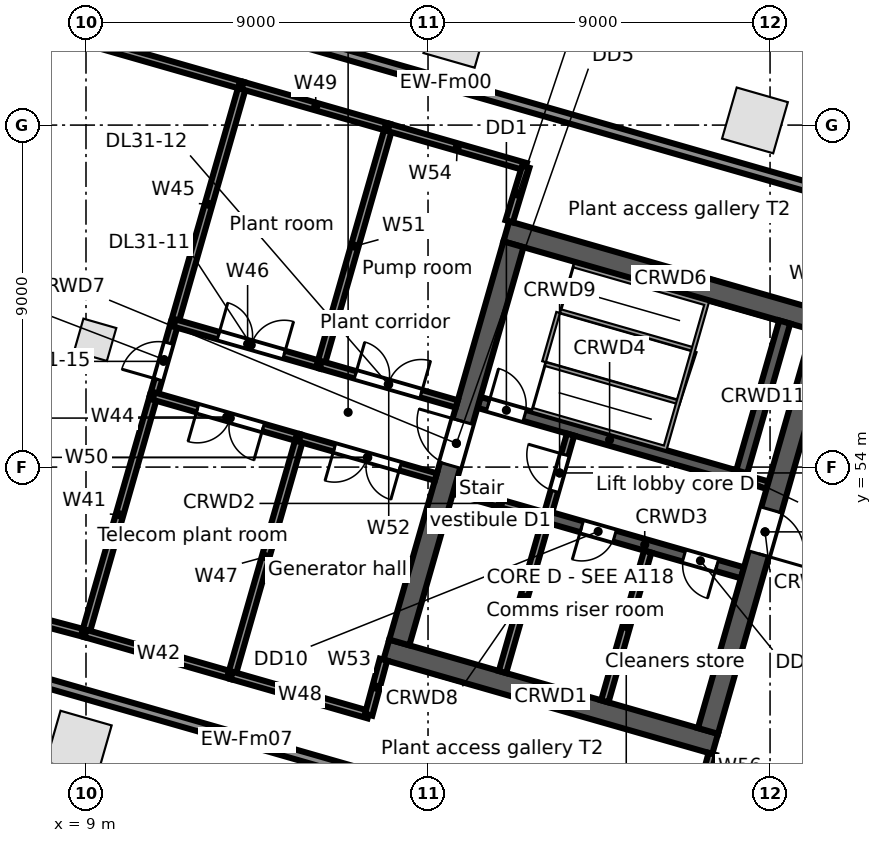
"""IFC4 building model, lengths in metres.
Left out: names, types, materials, properties, quantities, classifications, styles, units other than length and angle.
Written with IfcOpenShell. Run it as: python <this file> out.ifc"""

import sys

from ifc_helpers import new_model, si_unit, direction, frame, frame_2d, origin, origin_2d, place, context, subcontext, project, spatial, rectangle, extrude, element, fill, save


model = new_model("IFC4")
c1 = context("Model", 3, precision=1e-05, world=origin(), true_north=direction((0.0, 1.0)))
c2 = subcontext(c1, "Body", "Model", "MODEL_VIEW")
j1 = project(units=[si_unit("LENGTHUNIT", "METRE"), si_unit("PLANEANGLEUNIT", "RADIAN")], contexts=[c1])
p1 = place(None, origin())
s1 = spatial("IfcSite", under=j1, at=p1, CompositionType="ELEMENT")
p2 = place(p1, origin())
s2 = spatial("IfcBuilding", under=s1, at=p2, CompositionType="ELEMENT")
p3 = place(p2, frame((0.0, 0.0, 149.9)))
s3 = spatial("IfcBuildingStorey", under=s2, at=p3, CompositionType="ELEMENT", Elevation=149.9)
for number, where, z_axis, x_axis in (
    (1, (26.603, 63.124, 0.0), (0.0, 0.0, 1.0), (-0.961, 0.276, 0.0)),
    (2, (18.746, 65.376, 0.0), (0.0, 0.0, 1.0), (-0.961, 0.276, 0.0)),
    (3, (8.81, 46.722, 0.0), (0.0, 0.0, 1.0), (0.961, -0.276, 0.0)),
):
    element("IfcColumn", number, at=place(p3, frame(where, z_axis=z_axis, x_axis=x_axis)), inside=s3, PredefinedType="COLUMN", context=c2, shape_type="SweptSolid", body=[
        extrude(rectangle(XDim=1.4, YDim=1.4, at=origin_2d()), origin(), (0.0, 0.0, 1.0), 5.0),
    ])
p4 = place(p3, frame((9.241, 57.35, 0.0), z_axis=(0.0, 0.0, 1.0), x_axis=(0.961261695938, -0.275637355817, 0.0)))
e4 = element("IfcColumn", 4, at=p4, inside=s3, PredefinedType="COLUMN", context=c2, shape_type="SweptSolid", body=[
    extrude(rectangle(XDim=0.9, YDim=0.9, at=origin_2d()), origin(), (0.0, 0.0, 1.0), 5.0),
])
p5 = place(p3, frame((3.135, 68.5, 0.0), z_axis=(0.0, 0.0, 1.0), x_axis=(0.961261620067, -0.275637620413, 0.0)))
e5 = element("IfcWall", 5, at=p5, inside=s3, PredefinedType="STANDARD", context=c2, shape_type="SweptSolid", body=[
    extrude(rectangle(XDim=31.907, YDim=0.25, at=frame_2d((15.953, 0.0))), origin(), (0.0, 0.0, 1.0), 3.768),
])
p6 = place(p3, frame((26.726, 42.937, 0.0), z_axis=(0.0, 0.0, 1.0), x_axis=(-0.96126039977, 0.275641876052, 0.0)))
e6 = element("IfcWall", 6, at=p6, inside=s3, PredefinedType="STANDARD", context=c2, shape_type="SweptSolid", body=[
    extrude(rectangle(XDim=28.083, YDim=0.25, at=frame_2d((14.041, 0.0))), origin(), (0.0, 0.0, 1.0), 3.768),
])
p7 = place(p3, frame((16.904, 49.197, 0.0), z_axis=(0.0, 0.0, 1.0), x_axis=(0.96126248289, -0.275634611374, 0.0)))
e7 = element("IfcWall", 7, at=p7, inside=s3, PredefinedType="SOLIDWALL", context=c2, shape_type="SweptSolid", body=[
    extrude(rectangle(XDim=9.0, YDim=0.55, at=frame_2d((4.5, 0.0))), origin(), (0.0, 0.0, 1.0), 4.68),
])
p8 = place(p3, frame((18.68, 53.396, 0.0), z_axis=(0.0, 0.0, 1.0), x_axis=(0.961234387647, -0.275732573349, 0.0)))
e8 = element("IfcWall", 8, at=p8, inside=s3, PredefinedType="SOLIDWALL", context=c2, shape_type="SweptSolid", body=[
    extrude(rectangle(XDim=2.55, YDim=0.2, at=frame_2d((1.275, 0.0))), origin(), (0.0, 0.0, 1.0), 4.68),
])
p9 = place(p3, frame((21.131, 52.692, 0.0), z_axis=(0.0, 0.0, 1.0), x_axis=(0.961265220997, -0.27562506218, 0.0)))
e9 = element("IfcWall", 9, at=p9, inside=s3, PredefinedType="SOLIDWALL", context=c2, shape_type="SweptSolid", body=[
    extrude(rectangle(XDim=5.35, YDim=0.3, at=frame_2d((2.675, 0.0))), origin(), (0.0, 0.0, 1.0), 4.68),
])
p10 = place(p9, frame((0.95, 0.0, 0.0)))
e10 = element("IfcOpeningElement", 10, at=p10, cuts=e9, PredefinedType="OPENING", context=c2, shape_type="SweptSolid", body=[
    extrude(rectangle(XDim=0.9, YDim=2.1, at=frame_2d((0.45, 1.05))), frame((0.0, 0.16, 0.0), z_axis=(0.0, -1.0, 0.0), x_axis=(1.0, 0.0, 0.0)), (0.0, 0.0, 1.0), 0.32),
])
p11 = place(p9, frame((3.75, 0.0, 0.0)))
e11 = element("IfcOpeningElement", 11, at=p11, cuts=e9, PredefinedType="OPENING", context=c2, shape_type="SweptSolid", body=[
    extrude(rectangle(XDim=0.9, YDim=2.1, at=frame_2d((0.45, 1.05))), frame((0.0, 0.16, 0.0), z_axis=(0.0, -1.0, 0.0), x_axis=(1.0, 0.0, 0.0)), (0.0, 0.0, 1.0), 0.32),
])
p12 = place(p3, frame((19.341, 55.702, 0.0), z_axis=(0.0, 0.0, 1.0), x_axis=(0.961263228157, -0.27563201228, 0.0)))
e12 = element("IfcWall", 12, at=p12, inside=s3, PredefinedType="SOLIDWALL", context=c2, shape_type="SweptSolid", body=[
    extrude(rectangle(XDim=7.15, YDim=0.3, at=frame_2d((3.575, 0.0))), origin(), (0.0, 0.0, 1.0), 4.68),
])
p13 = place(p12, frame((0.25, 0.0, 0.0)))
e13 = element("IfcOpeningElement", 13, at=p13, cuts=e12, PredefinedType="OPENING", context=c2, shape_type="SweptSolid", body=[
    extrude(rectangle(XDim=1.0, YDim=2.1, at=frame_2d((0.5, 1.05))), frame((0.0, 0.16, 0.0), z_axis=(0.0, -1.0, 0.0), x_axis=(1.0, 0.0, 0.0)), (0.0, 0.0, 1.0), 0.32),
])
p14 = place(p3, frame((26.214, 53.732, 0.0), z_axis=(0.0, 0.0, 1.0), x_axis=(0.961240918172, -0.275709806194, 0.0)))
e14 = element("IfcWall", 14, at=p14, inside=s3, PredefinedType="SOLIDWALL", context=c2, shape_type="SweptSolid", body=[
    extrude(rectangle(XDim=0.75, YDim=0.2, at=frame_2d((0.375, 0.0))), origin(), (0.0, 0.0, 1.0), 4.68),
])
p15 = place(p3, frame((20.06, 60.204, 0.0), z_axis=(0.0, 0.0, 1.0), x_axis=(0.96126248289, -0.275634611374, 0.0)))
e15 = element("IfcWall", 15, at=p15, inside=s3, PredefinedType="SOLIDWALL", context=c2, shape_type="SweptSolid", body=[
    extrude(rectangle(XDim=9.0, YDim=0.55, at=frame_2d((4.5, 0.0))), origin(), (0.0, 0.0, 1.0), 4.68),
])
p16 = place(p3, frame((17.244, 49.386, 0.0), z_axis=(0.0, 0.0, 1.0), x_axis=(0.275632146085, 0.96126318979, 0.0)))
e16 = element("IfcWall", 16, at=p16, inside=s3, PredefinedType="SOLIDWALL", context=c2, shape_type="SweptSolid", body=[
    extrude(rectangle(XDim=10.9, YDim=0.55, at=frame_2d((5.45, 0.0))), origin(), (0.0, 0.0, 1.0), 4.68),
])
p17 = place(p16, frame((4.85, 0.0, 0.0)))
e17 = element("IfcOpeningElement", 17, at=p17, cuts=e16, PredefinedType="OPENING", context=c2, shape_type="SweptSolid", body=[
    extrude(rectangle(XDim=1.2, YDim=2.1, at=frame_2d((0.6, 1.05))), frame((0.0, 0.285, 0.0), z_axis=(0.0, -1.0, 0.0), x_axis=(1.0, 0.0, 0.0)), (0.0, 0.0, 1.0), 0.57),
])
p18 = place(p3, frame((19.959, 48.607, 0.0), z_axis=(0.0, 0.0, 1.0), x_axis=(0.275641165445, 0.961260603537, 0.0)))
e18 = element("IfcWall", 18, at=p18, inside=s3, PredefinedType="SOLIDWALL", context=c2, shape_type="SweptSolid", body=[
    extrude(rectangle(XDim=4.1, YDim=0.2, at=frame_2d((2.05, 0.0))), origin(), (0.0, 0.0, 1.0), 4.68),
])
p19 = place(p3, frame((21.172, 52.837, 0.0), z_axis=(0.0, 0.0, 1.0), x_axis=(0.275657676022, 0.961255868981, 0.0)))
e19 = element("IfcWall", 19, at=p19, inside=s3, PredefinedType="PARTITIONING", context=c2, shape_type="SweptSolid", body=[
    extrude(rectangle(XDim=2.1, YDim=0.2, at=frame_2d((1.05, 0.0))), origin(), (0.0, 0.0, 1.0), 4.68),
])
p20 = place(p19, frame((0.55, 0.0, 0.0)))
e20 = element("IfcOpeningElement", 20, at=p20, cuts=e19, PredefinedType="OPENING", context=c2, shape_type="SweptSolid", body=[
    extrude(rectangle(XDim=1.0, YDim=2.1, at=frame_2d((0.5, 1.05))), frame((0.0, 0.11, 0.0), z_axis=(0.0, -1.0, 0.0), x_axis=(1.0, 0.0, 0.0)), (0.0, 0.0, 1.0), 0.22),
])
p21 = place(p3, frame((22.651, 47.835, 0.0), z_axis=(0.0, 0.0, 1.0), x_axis=(0.275625388668, 0.961265127383, 0.0)))
e21 = element("IfcWall", 21, at=p21, inside=s3, PredefinedType="PARTITIONING", context=c2, shape_type="SweptSolid", body=[
    extrude(rectangle(XDim=4.1, YDim=0.2, at=frame_2d((2.05, 0.0))), origin(), (0.0, 0.0, 1.0), 4.68),
])
p22 = place(p3, frame((26.256, 53.876, 0.0), z_axis=(0.0, 0.0, 1.0), x_axis=(0.275641165445, 0.961260603537, 0.0)))
e22 = element("IfcWall", 22, at=p22, inside=s3, PredefinedType="SOLIDWALL", context=c2, shape_type="SweptSolid", body=[
    extrude(rectangle(XDim=4.1, YDim=0.3, at=frame_2d((2.05, 0.0))), origin(), (0.0, 0.0, 1.0), 4.68),
])
p23 = place(p3, frame((25.366, 47.057, 0.0), z_axis=(0.0, 0.0, 1.0), x_axis=(0.275632146085, 0.96126318979, 0.0)))
e23 = element("IfcWall", 23, at=p23, inside=s3, PredefinedType="SOLIDWALL", context=c2, shape_type="SweptSolid", body=[
    extrude(rectangle(XDim=10.9, YDim=0.55, at=frame_2d((5.45, 0.0))), origin(), (0.0, 0.0, 1.0), 4.68),
])
p24 = place(p23, frame((4.85, 0.0, 0.0)))
e24 = element("IfcOpeningElement", 24, at=p24, cuts=e23, PredefinedType="OPENING", context=c2, shape_type="SweptSolid", body=[
    extrude(rectangle(XDim=1.2, YDim=2.1, at=frame_2d((0.6, 1.05))), frame((0.0, 0.285, 0.0), z_axis=(0.0, -1.0, 0.0), x_axis=(1.0, 0.0, 0.0)), (0.0, 0.0, 1.0), 0.57),
])
p25 = place(p3, frame((0.0, 52.0, 0.0), z_axis=(0.0, 0.0, 1.0), x_axis=(0.966705801065, -0.255890394871, 0.0)))
e25 = element("IfcWall", 25, at=p25, inside=s3, PredefinedType="PARTITIONING", context=c2, shape_type="SweptSolid", body=[
    extrude(rectangle(XDim=9.297, YDim=0.2, at=frame_2d((4.648, 0.0))), origin(), (0.0, 0.0, 1.0), 3.86),
])
p26 = place(p3, frame((3.029, 66.934, 0.0), z_axis=(0.0, 0.0, 1.0), x_axis=(0.961263796718, -0.275630029421, 0.0)))
e26 = element("IfcWall", 26, at=p26, inside=s3, PredefinedType="PARTITIONING", context=c2, shape_type="SweptSolid", body=[
    extrude(rectangle(XDim=10.5, YDim=0.2, at=frame_2d((5.25, 0.0))), origin(), (0.0, 0.0, 1.0), 3.748),
])
p27 = place(p3, frame((8.987, 49.621, 0.0), z_axis=(0.0, 0.0, 1.0), x_axis=(0.275703259795, 0.961242795832, 0.0)))
e27 = element("IfcWall", 27, at=p27, inside=s3, PredefinedType="PARTITIONING", context=c2, shape_type="SweptSolid", body=[
    extrude(rectangle(XDim=6.5, YDim=0.2, at=frame_2d((3.25, 0.0))), origin(), (0.0, 0.0, 1.0), 3.86),
])
p28 = place(p3, frame((8.987, 49.621, 0.0), z_axis=(0.0, 0.0, 1.0), x_axis=(0.961228587008, -0.275752794216, 0.0)))
e28 = element("IfcWall", 28, at=p28, inside=s3, PredefinedType="PARTITIONING", context=c2, shape_type="SweptSolid", body=[
    extrude(rectangle(XDim=4.0, YDim=0.2, at=frame_2d((2.0, 0.0))), origin(), (0.0, 0.0, 1.0), 3.748),
])
p29 = place(p3, frame((10.779, 55.869, 0.0), z_axis=(0.0, 0.0, 1.0), x_axis=(0.275575706981, 0.961279371318, 0.0)))
e29 = element("IfcWall", 29, at=p29, inside=s3, PredefinedType="PARTITIONING", context=c2, shape_type="SweptSolid", body=[
    extrude(rectangle(XDim=2.0, YDim=0.2, at=frame_2d((1.0, 0.0))), origin(), (0.0, 0.0, 1.0), 3.748),
])
p30 = place(p29, frame((0.45, 0.0, 0.0)))
e30 = element("IfcOpeningElement", 30, at=p30, cuts=e29, PredefinedType="OPENING", context=c2, shape_type="SweptSolid", body=[
    extrude(rectangle(XDim=1.0, YDim=2.1, at=frame_2d((0.5, 1.05))), frame((0.0, 0.11, 0.0), z_axis=(0.0, -1.0, 0.0), x_axis=(1.0, 0.0, 0.0)), (0.0, 0.0, 1.0), 0.22),
])
p31 = place(p3, frame((10.779, 55.869, 0.0), z_axis=(0.0, 0.0, 1.0), x_axis=(0.961244763457, -0.275696399552, 0.0)))
e31 = element("IfcWall", 31, at=p31, inside=s3, PredefinedType="PARTITIONING", context=c2, shape_type="SweptSolid", body=[
    extrude(rectangle(XDim=4.0, YDim=0.2, at=frame_2d((2.0, 0.0))), origin(), (0.0, 0.0, 1.0), 3.748),
])
p32 = place(p31, frame((1.2, 0.0, 0.0)))
e32 = element("IfcOpeningElement", 32, at=p32, cuts=e31, PredefinedType="OPENING", context=c2, shape_type="SweptSolid", body=[
    extrude(rectangle(XDim=1.8, YDim=2.1, at=frame_2d((0.9, 1.05))), frame((0.0, 0.11, 0.0), z_axis=(0.0, -1.0, 0.0), x_axis=(1.0, 0.0, 0.0)), (0.0, 0.0, 1.0), 0.22),
])
p33 = place(p3, frame((11.33, 57.791, 0.0), z_axis=(0.0, 0.0, 1.0), x_axis=(0.27565349575, 0.96125706774, 0.0)))
e33 = element("IfcWall", 33, at=p33, inside=s3, PredefinedType="PARTITIONING", context=c2, shape_type="SweptSolid", body=[
    extrude(rectangle(XDim=6.501, YDim=0.2, at=frame_2d((3.25, 0.0))), origin(), (0.0, 0.0, 1.0), 3.748),
])
p34 = place(p3, frame((11.33, 57.791, 0.0), z_axis=(0.0, 0.0, 1.0), x_axis=(0.961293276216, -0.275527198479, 0.0)))
e34 = element("IfcWall", 34, at=p34, inside=s3, PredefinedType="PARTITIONING", context=c2, shape_type="SweptSolid", body=[
    extrude(rectangle(XDim=4.0, YDim=0.2, at=frame_2d((2.0, 0.0))), origin(), (0.0, 0.0, 1.0), 4.68),
])
p35 = place(p34, frame((1.2, 0.0, 0.0)))
e35 = element("IfcOpeningElement", 35, at=p35, cuts=e34, PredefinedType="OPENING", context=c2, shape_type="SweptSolid", body=[
    extrude(rectangle(XDim=1.8, YDim=2.1, at=frame_2d((0.9, 1.05))), frame((0.0, 0.11, 0.0), z_axis=(0.0, -1.0, 0.0), x_axis=(1.0, 0.0, 0.0)), (0.0, 0.0, 1.0), 0.22),
])
p36 = place(p3, frame((12.832, 48.518, 0.0), z_axis=(0.0, 0.0, 1.0), x_axis=(0.275693305607, 0.961245650832, 0.0)))
e36 = element("IfcWall", 36, at=p36, inside=s3, PredefinedType="PARTITIONING", context=c2, shape_type="SweptSolid", body=[
    extrude(rectangle(XDim=6.5, YDim=0.2, at=frame_2d((3.25, 0.0))), origin(), (0.0, 0.0, 1.0), 4.68),
])
p37 = place(p3, frame((12.832, 48.518, 0.0), z_axis=(0.0, 0.0, 1.0), x_axis=(0.961228613303, -0.275752702557, 0.0)))
e37 = element("IfcWall", 37, at=p37, inside=s3, PredefinedType="PARTITIONING", context=c2, shape_type="SweptSolid", body=[
    extrude(rectangle(XDim=3.75, YDim=0.2, at=frame_2d((1.875, 0.0))), origin(), (0.0, 0.0, 1.0), 4.68),
])
p38 = place(p3, frame((13.122, 64.04, 0.0), z_axis=(0.0, 0.0, 1.0), x_axis=(0.961228587008, -0.275752794216, 0.0)))
e38 = element("IfcWall", 38, at=p38, inside=s3, PredefinedType="PARTITIONING", context=c2, shape_type="SweptSolid", body=[
    extrude(rectangle(XDim=4.0, YDim=0.2, at=frame_2d((2.0, 0.0))), origin(), (0.0, 0.0, 1.0), 3.748),
])
p39 = place(p3, frame((14.624, 54.766, 0.0), z_axis=(0.0, 0.0, 1.0), x_axis=(0.961263923107, -0.275629588639, 0.0)))
e39 = element("IfcWall", 39, at=p39, inside=s3, PredefinedType="PARTITIONING", context=c2, shape_type="SweptSolid", body=[
    extrude(rectangle(XDim=3.726, YDim=0.2, at=frame_2d((1.863, 0.0))), origin(), (0.0, 0.0, 1.0), 4.68),
])
p40 = place(p39, frame((0.95, 0.0, 0.0)))
e40 = element("IfcOpeningElement", 40, at=p40, cuts=e39, PredefinedType="OPENING", context=c2, shape_type="SweptSolid", body=[
    extrude(rectangle(XDim=1.8, YDim=2.1, at=frame_2d((0.9, 1.05))), frame((0.0, 0.11, 0.0), z_axis=(0.0, -1.0, 0.0), x_axis=(1.0, 0.0, 0.0)), (0.0, 0.0, 1.0), 0.22),
])
p41 = place(p3, frame((15.175, 56.689, 0.0), z_axis=(0.0, 0.0, 1.0), x_axis=(0.275693305607, 0.961245650832, 0.0)))
e41 = element("IfcWall", 41, at=p41, inside=s3, PredefinedType="PARTITIONING", context=c2, shape_type="SweptSolid", body=[
    extrude(rectangle(XDim=6.5, YDim=0.2, at=frame_2d((3.25, 0.0))), origin(), (0.0, 0.0, 1.0), 4.68),
])
p42 = place(p3, frame((15.175, 56.689, 0.0), z_axis=(0.0, 0.0, 1.0), x_axis=(0.961281280398, -0.27556904753, 0.0)))
e42 = element("IfcWall", 42, at=p42, inside=s3, PredefinedType="PARTITIONING", context=c2, shape_type="SweptSolid", body=[
    extrude(rectangle(XDim=3.726, YDim=0.2, at=frame_2d((1.863, 0.0))), origin(), (0.0, 0.0, 1.0), 3.748),
])
p43 = place(p42, frame((0.95, 0.0, 0.0)))
e43 = element("IfcOpeningElement", 43, at=p43, cuts=e42, PredefinedType="OPENING", context=c2, shape_type="SweptSolid", body=[
    extrude(rectangle(XDim=1.8, YDim=2.1, at=frame_2d((0.9, 1.05))), frame((0.0, 0.11, 0.0), z_axis=(0.0, -1.0, 0.0), x_axis=(1.0, 0.0, 0.0)), (0.0, 0.0, 1.0), 0.22),
])
p44 = place(p3, frame((16.437, 47.484, 0.0), z_axis=(0.0, 0.0, 1.0), x_axis=(0.260405090968, 0.965499450335, 0.0)))
e44 = element("IfcWall", 44, at=p44, inside=s3, PredefinedType="PARTITIONING", context=c2, shape_type="SweptSolid", body=[
    extrude(rectangle(XDim=1.501, YDim=0.2, at=frame_2d((0.75, 0.0))), origin(), (0.0, 0.0, 1.0), 4.68),
])
p45 = place(p3, frame((16.967, 62.937, 0.0), z_axis=(0.0, 0.0, 1.0), x_axis=(0.961314848061, -0.275451924837, 0.0)))
e45 = element("IfcWall", 45, at=p45, inside=s3, PredefinedType="PARTITIONING", context=c2, shape_type="SweptSolid", body=[
    extrude(rectangle(XDim=3.75, YDim=0.2, at=frame_2d((1.875, 0.0))), origin(), (0.0, 0.0, 1.0), 3.748),
])
p46 = place(p3, frame((20.136, 60.468, 0.0), z_axis=(0.0, 0.0, 1.0), x_axis=(0.290540119102, 0.956862811061, 0.0)))
e46 = element("IfcWall", 46, at=p46, inside=s3, PredefinedType="PARTITIONING", context=c2, shape_type="SweptSolid", body=[
    extrude(rectangle(XDim=1.501, YDim=0.2, at=frame_2d((0.75, 0.0))), origin(), (0.0, 0.0, 1.0), 4.68),
])
p47 = place(p3, frame((25.088, 45.004, 0.0), z_axis=(0.0, 0.0, 1.0), x_axis=(0.260761429939, 0.965403271517, 0.0)))
e47 = element("IfcWall", 47, at=p47, inside=s3, PredefinedType="PARTITIONING", context=c2, shape_type="SweptSolid", body=[
    extrude(rectangle(XDim=1.5, YDim=0.2, at=frame_2d((0.75, 0.0))), origin(), (0.0, 0.0, 1.0), 4.68),
])
p48 = place(p3, frame((27.556, 44.099, 0.0), z_axis=(0.0, 0.0, 1.0), x_axis=(0.529908011914, 0.848055127282, 0.0)))
e48 = element("IfcWall", 48, at=p48, inside=s3, PredefinedType="PARTITIONING", context=c2, shape_type="SweptSolid", body=[
    extrude(rectangle(XDim=6.999, YDim=0.25, at=frame_2d((3.5, 0.0))), origin(), (0.0, 0.0, 1.0), 4.68),
])
p49 = place(p13, origin())
e49 = element("IfcDoor", 49, at=p49, inside=s3, OperationType="SINGLE_SWING_LEFT", PredefinedType="DOOR", context=c2, shape_type="SweptSolid", body=[
    extrude(rectangle(XDim=1.0, YDim=2.1, at=frame_2d((0.5, 1.05))), frame((0.0, 0.025, 0.0), z_axis=(0.0, -1.0, 0.0), x_axis=(1.0, 0.0, 0.0)), (0.0, 0.0, 1.0), 0.05),
])
fill(e13, e49)
p50 = place(p20, origin())
e50 = element("IfcDoor", 50, at=p50, inside=s3, OperationType="SINGLE_SWING_RIGHT", PredefinedType="DOOR", context=c2, shape_type="SweptSolid", body=[
    extrude(rectangle(XDim=1.0, YDim=2.1, at=frame_2d((0.5, 1.05))), frame((0.0, 0.025, 0.0), z_axis=(0.0, -1.0, 0.0), x_axis=(1.0, 0.0, 0.0)), (0.0, 0.0, 1.0), 0.05),
])
fill(e20, e50)
p51 = place(p17, origin())
e51 = element("IfcDoor", 51, at=p51, inside=s3, OperationType="SINGLE_SWING_RIGHT", PredefinedType="DOOR", context=c2, shape_type="SweptSolid", body=[
    extrude(rectangle(XDim=1.2, YDim=2.1, at=frame_2d((0.6, 1.05))), frame((0.0, 0.025, 0.0), z_axis=(0.0, -1.0, 0.0), x_axis=(1.0, 0.0, 0.0)), (0.0, 0.0, 1.0), 0.05),
])
fill(e17, e51)
p52 = place(p24, frame((1.2, 0.0, 0.0), z_axis=(0.0, 0.0, 1.0), x_axis=(-1.0, 0.0, 0.0)))
e52 = element("IfcDoor", 52, at=p52, inside=s3, OperationType="SINGLE_SWING_RIGHT", PredefinedType="DOOR", context=c2, shape_type="SweptSolid", body=[
    extrude(rectangle(XDim=1.2, YDim=2.1, at=frame_2d((0.6, 1.05))), frame((0.0, 0.025, 0.0), z_axis=(0.0, -1.0, 0.0), x_axis=(1.0, 0.0, 0.0)), (0.0, 0.0, 1.0), 0.05),
])
fill(e24, e52)
p53 = place(p10, frame((0.9, 0.0, 0.0), z_axis=(0.0, 0.0, 1.0), x_axis=(-1.0, 0.0, 0.0)))
e53 = element("IfcDoor", 53, at=p53, inside=s3, OperationType="SINGLE_SWING_RIGHT", PredefinedType="DOOR", context=c2, shape_type="SweptSolid", body=[
    extrude(rectangle(XDim=0.9, YDim=2.1, at=frame_2d((0.45, 1.05))), frame((0.0, 0.025, 0.0), z_axis=(0.0, -1.0, 0.0), x_axis=(1.0, 0.0, 0.0)), (0.0, 0.0, 1.0), 0.05),
])
fill(e10, e53)
p54 = place(p11, frame((0.9, 0.0, 0.0), z_axis=(0.0, 0.0, 1.0), x_axis=(-1.0, 0.0, 0.0)))
e54 = element("IfcDoor", 54, at=p54, inside=s3, OperationType="SINGLE_SWING_LEFT", PredefinedType="DOOR", context=c2, shape_type="SweptSolid", body=[
    extrude(rectangle(XDim=0.9, YDim=2.1, at=frame_2d((0.45, 1.05))), frame((0.0, 0.025, 0.0), z_axis=(0.0, -1.0, 0.0), x_axis=(1.0, 0.0, 0.0)), (0.0, 0.0, 1.0), 0.05),
])
fill(e11, e54)
p55 = place(p35, origin())
e55 = element("IfcDoor", 55, at=p55, inside=s3, OperationType="DOUBLE_DOOR_SINGLE_SWING", PredefinedType="DOOR", context=c2, shape_type="SweptSolid", body=[
    extrude(rectangle(XDim=1.8, YDim=2.1, at=frame_2d((0.9, 1.05))), frame((0.0, 0.025, 0.0), z_axis=(0.0, -1.0, 0.0), x_axis=(1.0, 0.0, 0.0)), (0.0, 0.0, 1.0), 0.05),
])
fill(e35, e55)
p56 = place(p43, origin())
e56 = element("IfcDoor", 56, at=p56, inside=s3, OperationType="DOUBLE_DOOR_SINGLE_SWING", PredefinedType="DOOR", context=c2, shape_type="SweptSolid", body=[
    extrude(rectangle(XDim=1.8, YDim=2.1, at=frame_2d((0.9, 1.05))), frame((0.0, 0.025, 0.0), z_axis=(0.0, -1.0, 0.0), x_axis=(1.0, 0.0, 0.0)), (0.0, 0.0, 1.0), 0.05),
])
fill(e43, e56)
p57 = place(p32, frame((1.8, 0.0, 0.0), z_axis=(0.0, 0.0, 1.0), x_axis=(-1.0, 0.0, 0.0)))
e57 = element("IfcDoor", 57, at=p57, inside=s3, OperationType="DOUBLE_DOOR_SINGLE_SWING", PredefinedType="DOOR", context=c2, shape_type="SweptSolid", body=[
    extrude(rectangle(XDim=1.8, YDim=2.1, at=frame_2d((0.9, 1.05))), frame((0.0, 0.025, 0.0), z_axis=(0.0, -1.0, 0.0), x_axis=(1.0, 0.0, 0.0)), (0.0, 0.0, 1.0), 0.05),
])
fill(e32, e57)
p58 = place(p40, frame((1.8, 0.0, 0.0), z_axis=(0.0, 0.0, 1.0), x_axis=(-1.0, 0.0, 0.0)))
e58 = element("IfcDoor", 58, at=p58, inside=s3, OperationType="DOUBLE_DOOR_SINGLE_SWING", PredefinedType="DOOR", context=c2, shape_type="SweptSolid", body=[
    extrude(rectangle(XDim=1.8, YDim=2.1, at=frame_2d((0.9, 1.05))), frame((0.0, 0.025, 0.0), z_axis=(0.0, -1.0, 0.0), x_axis=(1.0, 0.0, 0.0)), (0.0, 0.0, 1.0), 0.05),
])
fill(e40, e58)
p59 = place(p30, origin())
e59 = element("IfcDoor", 59, at=p59, inside=s3, OperationType="SINGLE_SWING_LEFT", PredefinedType="DOOR", context=c2, shape_type="SweptSolid", body=[
    extrude(rectangle(XDim=1.0, YDim=2.1, at=frame_2d((0.5, 1.05))), frame((0.0, 0.025, 0.0), z_axis=(0.0, -1.0, 0.0), x_axis=(1.0, 0.0, 0.0)), (0.0, 0.0, 1.0), 0.05),
])
fill(e30, e59)
save(model, sys.argv[1])
